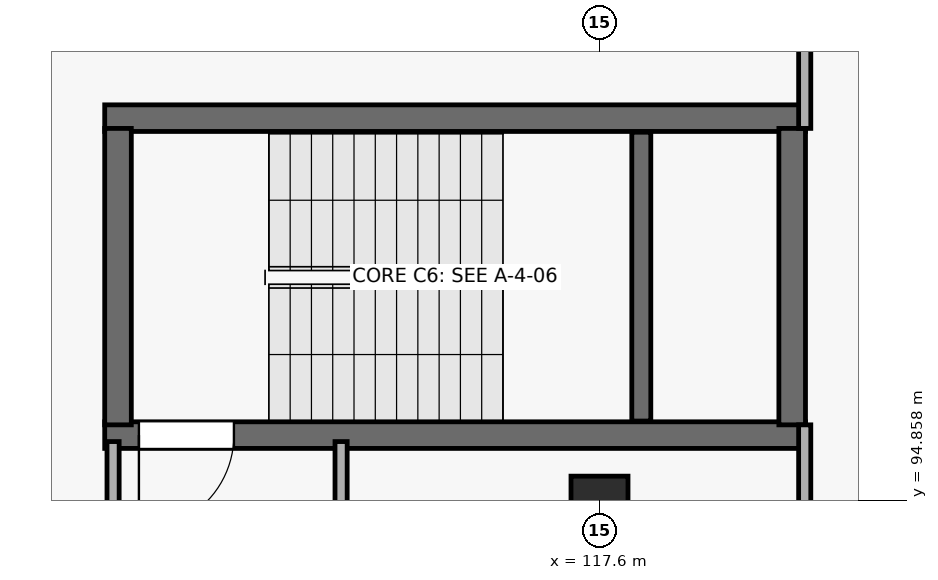
"""IFC4 building model, lengths in metres.
Left out: names, types, materials, properties, quantities, classifications, styles, units other than length and angle.
Written with IfcOpenShell. Run it as: python <this file> out.ifc"""

import sys

from ifc_helpers import new_model, si_unit, direction, frame, frame_2d, origin, origin_2d, place, context, subcontext, project, spatial, rectangle, extrude, element, fill, save


model = new_model("IFC4")
c1 = context("Model", 3, precision=1e-05, world=origin(), true_north=direction((0.0, 1.0)))
c2 = subcontext(c1, "Body", "Model", "MODEL_VIEW")
j1 = project(units=[si_unit("LENGTHUNIT", "METRE"), si_unit("PLANEANGLEUNIT", "RADIAN")], contexts=[c1])
p1 = place(None, origin())
s1 = spatial("IfcSite", under=j1, at=p1, CompositionType="ELEMENT")
p2 = place(p1, origin())
s2 = spatial("IfcBuilding", under=s1, at=p2, CompositionType="ELEMENT")
p3 = place(p2, frame((0.0, 0.0, -4.5)))
s3 = spatial("IfcBuildingStorey", under=s2, at=p3, CompositionType="ELEMENT", Elevation=-4.5)
p4 = place(p3, frame((117.6, 94.8, -0.3), z_axis=(0.0, 0.0, 1.0), x_axis=(1.0, 0.0, 0.0)))
e1 = element("IfcColumn", 1, at=p4, inside=s3, PredefinedType="COLUMN", context=c2, shape_type="SweptSolid", body=[
    extrude(rectangle(XDim=0.75, YDim=0.75, at=origin_2d()), origin(), (0.0, 0.0, 1.0), 4.8),
])
p5 = place(p3, frame((111.09, 95.715, 0.0), z_axis=(0.0, 0.0, 1.0), x_axis=(1.0, 0.0, 0.0)))
e2 = element("IfcWall", 2, at=p5, inside=s3, PredefinedType="SHEAR", context=c2, shape_type="SweptSolid", body=[
    extrude(rectangle(XDim=9.22, YDim=0.35, at=frame_2d((4.61, 0.0))), origin(), (0.0, 0.0, 1.0), 4.22),
])
p6 = place(p5, frame((0.45, 0.0, 0.0)))
e3 = element("IfcOpeningElement", 3, at=p6, cuts=e2, PredefinedType="OPENING", context=c2, shape_type="SweptSolid", body=[
    extrude(rectangle(XDim=1.25, YDim=2.2, at=frame_2d((0.625, 1.1))), frame((0.0, 0.185, 0.0), z_axis=(0.0, -1.0, 0.0), x_axis=(1.0, 0.0, 0.0)), (0.0, 0.0, 1.0), 0.37),
])
p7 = place(p3, frame((120.31, 99.885, 0.0), z_axis=(0.0, 0.0, 1.0), x_axis=(-1.0, 0.0, 0.0)))
e4 = element("IfcWall", 4, at=p7, inside=s3, PredefinedType="SHEAR", context=c2, shape_type="SweptSolid", body=[
    extrude(rectangle(XDim=9.22, YDim=0.35, at=frame_2d((4.61, 0.0))), origin(), (0.0, 0.0, 1.0), 4.22),
])
for number, where, z_axis, x_axis in (
    (5, (111.265, 95.85, 0.0), (0.0, 0.0, 1.0), (0.0, 1.0, 0.0)),
    (6, (120.135, 99.75, 0.0), (0.0, 0.0, 1.0), (0.0, -1.0, 0.0)),
):
    element("IfcWall", number, at=place(p3, frame(where, z_axis=z_axis, x_axis=x_axis)), inside=s3, PredefinedType="SHEAR", context=c2, shape_type="SweptSolid", body=[
        extrude(rectangle(XDim=3.9, YDim=0.35, at=frame_2d((1.95, 0.0))), origin(), (0.0, 0.0, 1.0), 4.22),
    ])
p8 = place(p3, frame((118.15, 95.9, 0.0), z_axis=(0.0, 0.0, 1.0), x_axis=(0.0, 1.0, 0.0)))
e7 = element("IfcWall", 7, at=p8, inside=s3, PredefinedType="SHEAR", context=c2, shape_type="SweptSolid", body=[
    extrude(rectangle(XDim=3.8, YDim=0.25, at=frame_2d((1.9, 0.0))), origin(), (0.0, 0.0, 1.0), 2.07),
])
p9 = place(p3, frame((120.3, 109.5, 0.0), z_axis=(0.0, 0.0, 1.0), x_axis=(0.0, -1.0, 0.0)))
e8 = element("IfcWall", 8, at=p9, inside=s3, PredefinedType="PARTITIONING", context=c2, shape_type="SweptSolid", body=[
    extrude(rectangle(XDim=9.75, YDim=0.16, at=frame_2d((4.875, 0.0))), origin(), (0.0, 0.0, 1.0), 4.22),
])
p10 = place(p3, frame((120.3, 95.85, 0.0), z_axis=(0.0, 0.0, 1.0), x_axis=(0.0, -1.0, 0.0)))
e9 = element("IfcWall", 9, at=p10, inside=s3, PredefinedType="PARTITIONING", context=c2, shape_type="SweptSolid", body=[
    extrude(rectangle(XDim=1.75, YDim=0.16, at=frame_2d((0.875, 0.0))), origin(), (0.0, 0.0, 1.0), 4.22),
])
for number, where, z_axis, x_axis in (
    (10, (114.2, 94.26, 0.0), (0.0, 0.0, 1.0), (0.0, 1.0, 0.0)),
    (11, (111.2, 95.63, 0.0), (0.0, 0.0, 1.0), (0.0, -1.0, 0.0)),
):
    element("IfcWall", number, at=place(p3, frame(where, z_axis=z_axis, x_axis=x_axis)), inside=s3, PredefinedType="PARTITIONING", context=c2, shape_type="SweptSolid", body=[
        extrude(rectangle(XDim=1.37, YDim=0.16, at=frame_2d((0.685, 0.0))), origin(), (0.0, 0.0, 1.0), 4.22),
    ])
p11 = place(p6, origin())
e12 = element("IfcDoor", 12, at=p11, inside=s3, OperationType="SINGLE_SWING_RIGHT", PredefinedType="DOOR", context=c2, shape_type="SweptSolid", body=[
    extrude(rectangle(XDim=1.25, YDim=2.2, at=frame_2d((0.625, 1.1))), frame((0.0, 0.025, 0.0), z_axis=(0.0, -1.0, 0.0), x_axis=(1.0, 0.0, 0.0)), (0.0, 0.0, 1.0), 0.05),
])
fill(e3, e12)
save(model, sys.argv[1])
